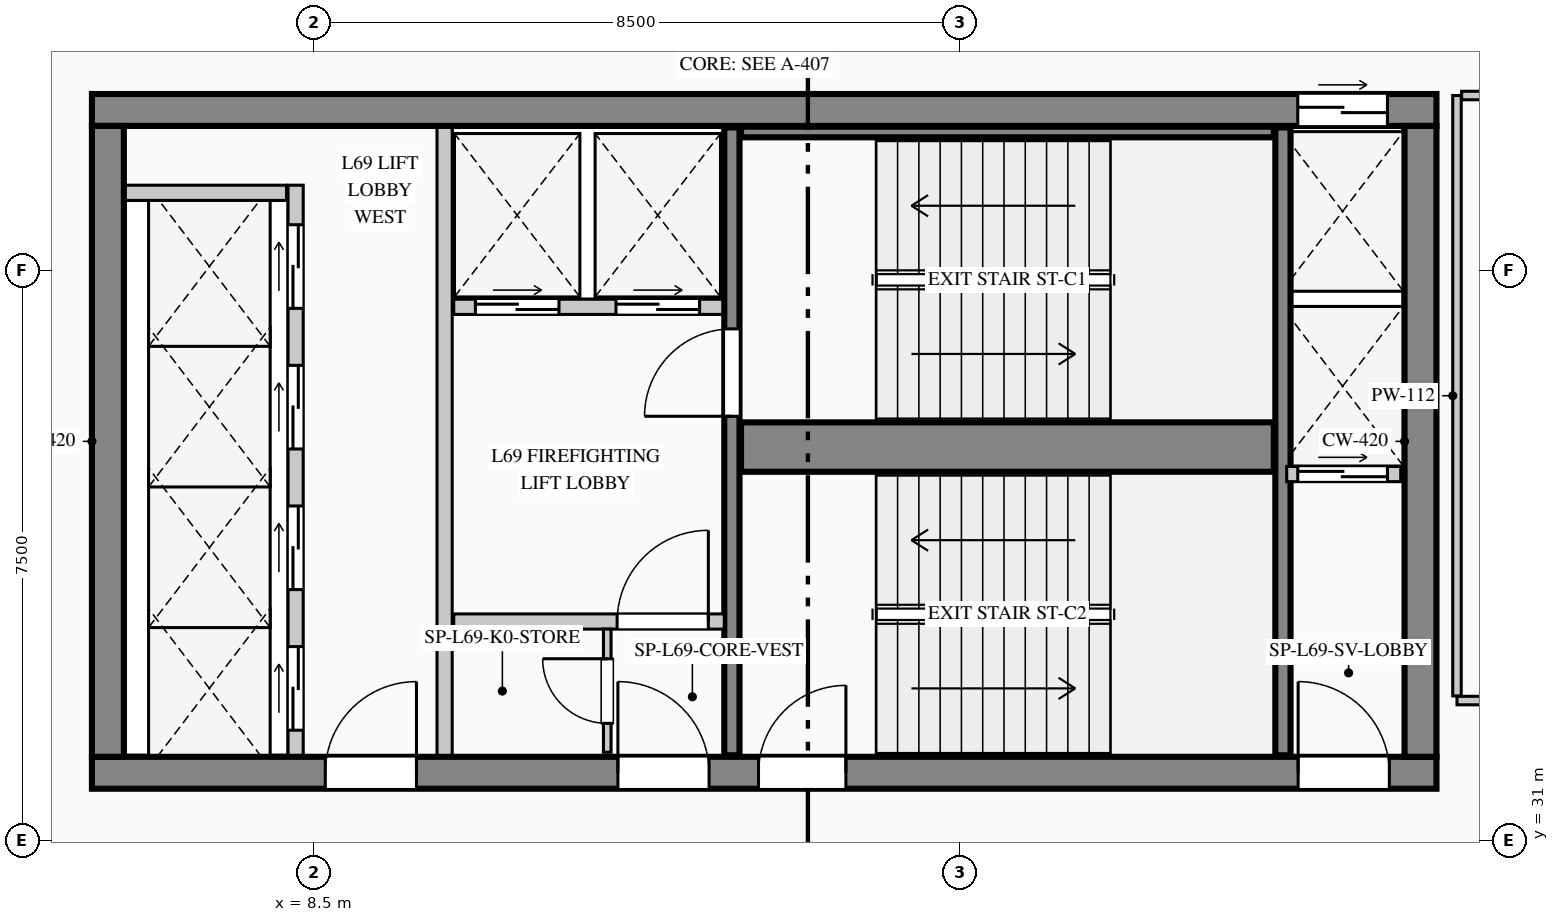
"""IFC4 building model, lengths in metres.
Left out: names, types, materials, properties, quantities, classifications, styles, units other than length and angle.
Written with IfcOpenShell. Run it as: python <this file> out.ifc"""

import sys

from ifc_helpers import new_model, si_unit, direction, frame, frame_2d, origin, place, context, subcontext, project, spatial, rectangle, extrude, element, fill, save


model = new_model("IFC4")
c1 = context("Model", 3, precision=1e-05, world=origin(), true_north=direction((0.0, 1.0)))
c2 = subcontext(c1, "Body", "Model", "MODEL_VIEW")
j1 = project(units=[si_unit("LENGTHUNIT", "METRE"), si_unit("PLANEANGLEUNIT", "RADIAN")], contexts=[c1])
p1 = place(None, origin())
s1 = spatial("IfcSite", under=j1, at=p1, CompositionType="ELEMENT")
p2 = place(p1, origin())
s2 = spatial("IfcBuilding", under=s1, at=p2, CompositionType="ELEMENT")
p3 = place(p2, frame((0.0, 0.0, 288.3)))
s3 = spatial("IfcBuildingStorey", under=s2, at=p3, CompositionType="ELEMENT", Elevation=288.3)
p4 = place(p3, frame((5.58, 40.61, 0.0), z_axis=(0.0, 0.0, 1.0), x_axis=(1.0, 0.0, 0.0)))
e1 = element("IfcWall", 1, at=p4, inside=s3, PredefinedType="SHEAR", context=c2, shape_type="SweptSolid", body=[
    extrude(rectangle(XDim=17.69, YDim=0.42, at=frame_2d((8.845, 0.0))), origin(), (0.0, 0.0, 1.0), 3.95),
])
p5 = place(p4, frame((15.865, 0.0, 0.0)))
e2 = element("IfcOpeningElement", 2, at=p5, cuts=e1, PredefinedType="OPENING", context=c2, shape_type="SweptSolid", body=[
    extrude(rectangle(XDim=1.18, YDim=2.25, at=frame_2d((0.59, 1.125))), frame((0.0, 0.22, 0.0), z_axis=(0.0, -1.0, 0.0), x_axis=(1.0, 0.0, 0.0)), (0.0, 0.0, 1.0), 0.44),
])
p6 = place(p3, frame((5.58, 31.89, 0.0), z_axis=(0.0, 0.0, 1.0), x_axis=(1.0, 0.0, 0.0)))
e3 = element("IfcWall", 3, at=p6, inside=s3, PredefinedType="SHEAR", context=c2, shape_type="SweptSolid", body=[
    extrude(rectangle(XDim=17.69, YDim=0.42, at=frame_2d((8.845, 0.0))), origin(), (0.0, 0.0, 1.0), 3.95),
])
p7 = place(p6, frame((3.07, 0.0, 0.0)))
e4 = element("IfcOpeningElement", 4, at=p7, cuts=e3, PredefinedType="OPENING", context=c2, shape_type="SweptSolid", body=[
    extrude(rectangle(XDim=1.2, YDim=2.2, at=frame_2d((0.6, 1.1))), frame((0.0, 0.22, 0.0), z_axis=(0.0, -1.0, 0.0), x_axis=(1.0, 0.0, 0.0)), (0.0, 0.0, 1.0), 0.44),
])
p8 = place(p6, frame((6.92, 0.0, 0.0)))
e5 = element("IfcOpeningElement", 5, at=p8, cuts=e3, PredefinedType="OPENING", context=c2, shape_type="SweptSolid", body=[
    extrude(rectangle(XDim=1.2, YDim=2.2, at=frame_2d((0.6, 1.1))), frame((0.0, 0.22, 0.0), z_axis=(0.0, -1.0, 0.0), x_axis=(1.0, 0.0, 0.0)), (0.0, 0.0, 1.0), 0.44),
])
p9 = place(p6, frame((8.77, 0.0, 0.0)))
e6 = element("IfcOpeningElement", 6, at=p9, cuts=e3, PredefinedType="OPENING", context=c2, shape_type="SweptSolid", body=[
    extrude(rectangle(XDim=1.15, YDim=2.2, at=frame_2d((0.575, 1.1))), frame((0.0, 0.22, 0.0), z_axis=(0.0, -1.0, 0.0), x_axis=(1.0, 0.0, 0.0)), (0.0, 0.0, 1.0), 0.44),
])
p10 = place(p6, frame((15.87, 0.0, 0.0)))
e7 = element("IfcOpeningElement", 7, at=p10, cuts=e3, PredefinedType="OPENING", context=c2, shape_type="SweptSolid", body=[
    extrude(rectangle(XDim=1.2, YDim=2.2, at=frame_2d((0.6, 1.1))), frame((0.0, 0.22, 0.0), z_axis=(0.0, -1.0, 0.0), x_axis=(1.0, 0.0, 0.0)), (0.0, 0.0, 1.0), 0.44),
])
for number, where, z_axis, x_axis in (
    (8, (5.79, 32.1, 0.0), (0.0, 0.0, 1.0), (0.0, 1.0, 0.0)),
    (9, (23.06, 32.1, 0.0), (0.0, 0.0, 1.0), (0.0, 1.0, 0.0)),
):
    element("IfcWall", number, at=place(p3, frame(where, z_axis=z_axis, x_axis=x_axis)), inside=s3, PredefinedType="SHEAR", context=c2, shape_type="SweptSolid", body=[
        extrude(rectangle(XDim=8.3, YDim=0.42, at=frame_2d((4.15, 0.0))), origin(), (0.0, 0.0, 1.0), 3.95),
    ])
p11 = place(p3, frame((14.0, 32.12, 0.0), z_axis=(0.0, 0.0, 1.0), x_axis=(0.0, 1.0, 0.0)))
e10 = element("IfcWall", 10, at=p11, inside=s3, PredefinedType="SHEAR", context=c2, shape_type="SweptSolid", body=[
    extrude(rectangle(XDim=8.26, YDim=0.2, at=frame_2d((4.13, 0.0))), origin(), (0.0, 0.0, 1.0), 3.95),
])
p12 = place(p11, frame((4.46, 0.0, 0.0)))
e11 = element("IfcOpeningElement", 11, at=p12, cuts=e10, PredefinedType="OPENING", context=c2, shape_type="SweptSolid", body=[
    extrude(rectangle(XDim=1.15, YDim=2.2, at=frame_2d((0.575, 1.1))), frame((0.0, 0.11, 0.0), z_axis=(0.0, -1.0, 0.0), x_axis=(1.0, 0.0, 0.0)), (0.0, 0.0, 1.0), 0.22),
])
p13 = place(p3, frame((14.12, 36.175, 0.0), z_axis=(0.0, 0.0, 1.0), x_axis=(1.0, 0.0, 0.0)))
e12 = element("IfcWall", 12, at=p13, inside=s3, PredefinedType="SHEAR", context=c2, shape_type="SweptSolid", body=[
    extrude(rectangle(XDim=7.01, YDim=0.65, at=frame_2d((3.505, 0.0))), origin(), (0.0, 0.0, 1.0), 3.95),
])
p14 = place(p3, frame((21.25, 32.12, 0.0), z_axis=(0.0, 0.0, 1.0), x_axis=(0.0, 1.0, 0.0)))
e13 = element("IfcWall", 13, at=p14, inside=s3, PredefinedType="SHEAR", context=c2, shape_type="SweptSolid", body=[
    extrude(rectangle(XDim=8.26, YDim=0.2, at=frame_2d((4.13, 0.0))), origin(), (0.0, 0.0, 1.0), 3.95),
])
p15 = place(p3, frame((14.12, 40.32, 0.0), z_axis=(0.0, 0.0, 1.0), x_axis=(1.0, 0.0, 0.0)))
e14 = element("IfcWall", 14, at=p15, inside=s3, PredefinedType="SHEAR", context=c2, shape_type="SweptSolid", body=[
    extrude(rectangle(XDim=7.01, YDim=0.14, at=frame_2d((3.505, 0.0))), origin(), (0.0, 0.0, 1.0), 3.95),
])
p16 = place(p3, frame((5.6, 4.32, 0.0), z_axis=(0.0, 0.0, 1.0), x_axis=(-0.075839920993, 0.997120006009, 0.0)))
e15 = element("IfcWall", 15, at=p16, inside=s3, PredefinedType="STANDARD", context=c2, shape_type="SweptSolid", body=[
    extrude(rectangle(XDim=37.468, YDim=0.24, at=frame_2d((18.734, 0.0))), origin(), (0.0, 0.0, 1.0), 3.7),
])
p17 = place(p16, frame((23.154, 0.0, 0.9)))
e16 = element("IfcOpeningElement", 16, at=p17, cuts=e15, PredefinedType="OPENING", context=c2, shape_type="SweptSolid", body=[
    extrude(rectangle(XDim=1.65, YDim=1.95, at=frame_2d((0.825, 0.975))), frame((0.0, 0.13, 0.0), z_axis=(0.0, -1.0, 0.0), x_axis=(1.0, 0.0, 0.0)), (0.0, 0.0, 1.0), 0.26),
])
p18 = place(p3, frame((8.26, 32.12, 0.0), z_axis=(0.0, 0.0, 1.0), x_axis=(0.0, 1.0, 0.0)))
e17 = element("IfcWall", 17, at=p18, inside=s3, PredefinedType="PARTITIONING", context=c2, shape_type="SweptSolid", body=[
    extrude(rectangle(XDim=7.5, YDim=0.2, at=frame_2d((3.75, 0.0))), origin(), (0.0, 0.0, 1.0), 3.7),
])
p19 = place(p18, frame((0.33, 0.0, 0.0)))
e18 = element("IfcOpeningElement", 18, at=p19, cuts=e17, PredefinedType="OPENING", context=c2, shape_type="SweptSolid", body=[
    extrude(rectangle(XDim=1.1, YDim=2.2, at=frame_2d((0.55, 1.1))), frame((0.0, 0.11, 0.0), z_axis=(0.0, -1.0, 0.0), x_axis=(1.0, 0.0, 0.0)), (0.0, 0.0, 1.0), 0.22),
])
p20 = place(p18, frame((2.18, 0.0, 0.0)))
e19 = element("IfcOpeningElement", 19, at=p20, cuts=e17, PredefinedType="OPENING", context=c2, shape_type="SweptSolid", body=[
    extrude(rectangle(XDim=1.1, YDim=2.2, at=frame_2d((0.55, 1.1))), frame((0.0, 0.11, 0.0), z_axis=(0.0, -1.0, 0.0), x_axis=(1.0, 0.0, 0.0)), (0.0, 0.0, 1.0), 0.22),
])
p21 = place(p18, frame((4.03, 0.0, 0.0)))
e20 = element("IfcOpeningElement", 20, at=p21, cuts=e17, PredefinedType="OPENING", context=c2, shape_type="SweptSolid", body=[
    extrude(rectangle(XDim=1.1, YDim=2.2, at=frame_2d((0.55, 1.1))), frame((0.0, 0.11, 0.0), z_axis=(0.0, -1.0, 0.0), x_axis=(1.0, 0.0, 0.0)), (0.0, 0.0, 1.0), 0.22),
])
p22 = place(p18, frame((5.88, 0.0, 0.0)))
e21 = element("IfcOpeningElement", 21, at=p22, cuts=e17, PredefinedType="OPENING", context=c2, shape_type="SweptSolid", body=[
    extrude(rectangle(XDim=1.1, YDim=2.2, at=frame_2d((0.55, 1.1))), frame((0.0, 0.11, 0.0), z_axis=(0.0, -1.0, 0.0), x_axis=(1.0, 0.0, 0.0)), (0.0, 0.0, 1.0), 0.22),
])
p23 = place(p3, frame((6.02, 39.52, 0.0), z_axis=(0.0, 0.0, 1.0), x_axis=(1.0, 0.0, 0.0)))
e22 = element("IfcWall", 22, at=p23, inside=s3, PredefinedType="PARTITIONING", context=c2, shape_type="SweptSolid", body=[
    extrude(rectangle(XDim=2.12, YDim=0.2, at=frame_2d((1.06, 0.0))), origin(), (0.0, 0.0, 1.0), 3.7),
])
p24 = place(p3, frame((10.22, 32.12, 0.0), z_axis=(0.0, 0.0, 1.0), x_axis=(0.0, 1.0, 0.0)))
e23 = element("IfcWall", 23, at=p24, inside=s3, PredefinedType="PARTITIONING", context=c2, shape_type="SweptSolid", body=[
    extrude(rectangle(XDim=8.26, YDim=0.2, at=frame_2d((4.13, 0.0))), origin(), (0.0, 0.0, 1.0), 3.7),
])
p25 = place(p3, frame((10.34, 38.02, 0.0), z_axis=(0.0, 0.0, 1.0), x_axis=(1.0, 0.0, 0.0)))
e24 = element("IfcWall", 24, at=p25, inside=s3, PredefinedType="PARTITIONING", context=c2, shape_type="SweptSolid", body=[
    extrude(rectangle(XDim=3.54, YDim=0.2, at=frame_2d((1.77, 0.0))), origin(), (0.0, 0.0, 1.0), 3.7),
])
p26 = place(p25, frame((0.285, 0.0, 0.0)))
e25 = element("IfcOpeningElement", 25, at=p26, cuts=e24, PredefinedType="OPENING", context=c2, shape_type="SweptSolid", body=[
    extrude(rectangle(XDim=1.1, YDim=2.2, at=frame_2d((0.55, 1.1))), frame((0.0, 0.11, 0.0), z_axis=(0.0, -1.0, 0.0), x_axis=(1.0, 0.0, 0.0)), (0.0, 0.0, 1.0), 0.22),
])
p27 = place(p25, frame((2.135, 0.0, 0.0)))
e26 = element("IfcOpeningElement", 26, at=p27, cuts=e24, PredefinedType="OPENING", context=c2, shape_type="SweptSolid", body=[
    extrude(rectangle(XDim=1.1, YDim=2.2, at=frame_2d((0.55, 1.1))), frame((0.0, 0.11, 0.0), z_axis=(0.0, -1.0, 0.0), x_axis=(1.0, 0.0, 0.0)), (0.0, 0.0, 1.0), 0.22),
])
p28 = place(p3, frame((10.34, 33.88, 0.0), z_axis=(0.0, 0.0, 1.0), x_axis=(1.0, 0.0, 0.0)))
e27 = element("IfcWall", 27, at=p28, inside=s3, PredefinedType="PARTITIONING", context=c2, shape_type="SweptSolid", body=[
    extrude(rectangle(XDim=3.56, YDim=0.2, at=frame_2d((1.78, 0.0))), origin(), (0.0, 0.0, 1.0), 3.7),
])
p29 = place(p28, frame((2.15, 0.0, 0.0)))
e28 = element("IfcOpeningElement", 28, at=p29, cuts=e27, PredefinedType="OPENING", context=c2, shape_type="SweptSolid", body=[
    extrude(rectangle(XDim=1.2, YDim=2.2, at=frame_2d((0.6, 1.1))), frame((0.0, 0.11, 0.0), z_axis=(0.0, -1.0, 0.0), x_axis=(1.0, 0.0, 0.0)), (0.0, 0.0, 1.0), 0.22),
])
p30 = place(p3, frame((12.36, 32.16, 0.0), z_axis=(0.0, 0.0, 1.0), x_axis=(0.0, 1.0, 0.0)))
e29 = element("IfcWall", 29, at=p30, inside=s3, PredefinedType="PARTITIONING", context=c2, shape_type="SweptSolid", body=[
    extrude(rectangle(XDim=1.62, YDim=0.1, at=frame_2d((0.81, 0.0))), origin(), (0.0, 0.0, 1.0), 3.7),
])
p31 = place(p30, frame((0.38, 0.0, 0.0)))
e30 = element("IfcOpeningElement", 30, at=p31, cuts=e29, PredefinedType="OPENING", context=c2, shape_type="SweptSolid", body=[
    extrude(rectangle(XDim=0.85, YDim=2.1, at=frame_2d((0.425, 1.05))), frame((0.0, 0.06, 0.0), z_axis=(0.0, -1.0, 0.0), x_axis=(1.0, 0.0, 0.0)), (0.0, 0.0, 1.0), 0.12),
])
p32 = place(p3, frame((21.3, 35.82, 0.0), z_axis=(0.0, 0.0, 1.0), x_axis=(1.0, 0.0, 0.0)))
e31 = element("IfcWall", 31, at=p32, inside=s3, PredefinedType="PARTITIONING", context=c2, shape_type="SweptSolid", body=[
    extrude(rectangle(XDim=1.5, YDim=0.2, at=frame_2d((0.75, 0.0))), origin(), (0.0, 0.0, 1.0), 3.7),
])
p33 = place(p32, frame((0.145, 0.0, 0.0)))
e32 = element("IfcOpeningElement", 32, at=p33, cuts=e31, PredefinedType="OPENING", context=c2, shape_type="SweptSolid", body=[
    extrude(rectangle(XDim=1.18, YDim=2.25, at=frame_2d((0.59, 1.125))), frame((0.0, 0.11, 0.0), z_axis=(0.0, -1.0, 0.0), x_axis=(1.0, 0.0, 0.0)), (0.0, 0.0, 1.0), 0.22),
])
p34 = place(p3, frame((28.654, 32.84, 0.0), z_axis=(0.0, 0.0, 1.0), x_axis=(-1.0, 0.0, 0.0)))
e33 = element("IfcWall", 33, at=p34, inside=s3, PredefinedType="PARTITIONING", context=c2, shape_type="SweptSolid", body=[
    extrude(rectangle(XDim=5.114, YDim=0.112, at=frame_2d((2.557, 0.0))), origin(), (0.0, 0.0, 1.0), 3.7),
])
p35 = place(p34, frame((2.677, 0.0, 0.0)))
e34 = element("IfcOpeningElement", 34, at=p35, cuts=e33, PredefinedType="OPENING", context=c2, shape_type="SweptSolid", body=[
    extrude(rectangle(XDim=1.0, YDim=2.15, at=frame_2d((0.5, 1.075))), frame((0.0, 0.066, 0.0), z_axis=(0.0, -1.0, 0.0), x_axis=(1.0, 0.0, 0.0)), (0.0, 0.0, 1.0), 0.132),
])
p36 = place(p3, frame((23.54, 32.901, 0.0), z_axis=(0.0, 0.0, 1.0), x_axis=(0.0, 1.0, 0.0)))
e35 = element("IfcWall", 35, at=p36, inside=s3, PredefinedType="PARTITIONING", context=c2, shape_type="SweptSolid", body=[
    extrude(rectangle(XDim=7.899, YDim=0.112, at=frame_2d((3.95, 0.0))), origin(), (0.0, 0.0, 1.0), 3.7),
])
p37 = place(p3, frame((23.601, 40.8, 0.0), z_axis=(0.0, 0.0, 1.0), x_axis=(1.0, 0.0, 0.0)))
e36 = element("IfcWall", 36, at=p37, inside=s3, PredefinedType="PARTITIONING", context=c2, shape_type="SweptSolid", body=[
    extrude(rectangle(XDim=5.869, YDim=0.112, at=frame_2d((2.935, 0.0))), origin(), (0.0, 0.0, 1.0), 3.7),
])
p38 = place(p7, origin())
e37 = element("IfcDoor", 37, at=p38, inside=s3, OperationType="SINGLE_SWING_RIGHT", PredefinedType="DOOR", context=c2, shape_type="SweptSolid", body=[
    extrude(rectangle(XDim=1.2, YDim=2.2, at=frame_2d((0.6, 1.1))), frame((0.0, 0.025, 0.0), z_axis=(0.0, -1.0, 0.0), x_axis=(1.0, 0.0, 0.0)), (0.0, 0.0, 1.0), 0.05),
])
fill(e4, e37)
p39 = place(p8, origin())
e38 = element("IfcDoor", 38, at=p39, inside=s3, OperationType="SINGLE_SWING_LEFT", PredefinedType="DOOR", context=c2, shape_type="SweptSolid", body=[
    extrude(rectangle(XDim=1.2, YDim=2.2, at=frame_2d((0.6, 1.1))), frame((0.0, 0.025, 0.0), z_axis=(0.0, -1.0, 0.0), x_axis=(1.0, 0.0, 0.0)), (0.0, 0.0, 1.0), 0.05),
])
fill(e5, e38)
p40 = place(p9, origin())
e39 = element("IfcDoor", 39, at=p40, inside=s3, OperationType="SINGLE_SWING_RIGHT", PredefinedType="DOOR", context=c2, shape_type="SweptSolid", body=[
    extrude(rectangle(XDim=1.15, YDim=2.2, at=frame_2d((0.575, 1.1))), frame((0.0, 0.025, 0.0), z_axis=(0.0, -1.0, 0.0), x_axis=(1.0, 0.0, 0.0)), (0.0, 0.0, 1.0), 0.05),
])
fill(e6, e39)
p41 = place(p10, origin())
e40 = element("IfcDoor", 40, at=p41, inside=s3, OperationType="SINGLE_SWING_LEFT", PredefinedType="DOOR", context=c2, shape_type="SweptSolid", body=[
    extrude(rectangle(XDim=1.2, YDim=2.2, at=frame_2d((0.6, 1.1))), frame((0.0, 0.025, 0.0), z_axis=(0.0, -1.0, 0.0), x_axis=(1.0, 0.0, 0.0)), (0.0, 0.0, 1.0), 0.05),
])
fill(e7, e40)
p42 = place(p29, origin())
e41 = element("IfcDoor", 41, at=p42, inside=s3, OperationType="SINGLE_SWING_RIGHT", PredefinedType="DOOR", context=c2, shape_type="SweptSolid", body=[
    extrude(rectangle(XDim=1.2, YDim=2.2, at=frame_2d((0.6, 1.1))), frame((0.0, 0.025, 0.0), z_axis=(0.0, -1.0, 0.0), x_axis=(1.0, 0.0, 0.0)), (0.0, 0.0, 1.0), 0.05),
])
fill(e28, e41)
p43 = place(p31, origin())
e42 = element("IfcDoor", 42, at=p43, inside=s3, OperationType="SINGLE_SWING_RIGHT", PredefinedType="DOOR", context=c2, shape_type="SweptSolid", body=[
    extrude(rectangle(XDim=0.85, YDim=2.1, at=frame_2d((0.425, 1.05))), frame((0.0, 0.025, 0.0), z_axis=(0.0, -1.0, 0.0), x_axis=(1.0, 0.0, 0.0)), (0.0, 0.0, 1.0), 0.05),
])
fill(e30, e42)
p44 = place(p12, origin())
e43 = element("IfcDoor", 43, at=p44, inside=s3, OperationType="SINGLE_SWING_LEFT", PredefinedType="DOOR", context=c2, shape_type="SweptSolid", body=[
    extrude(rectangle(XDim=1.15, YDim=2.2, at=frame_2d((0.575, 1.1))), frame((0.0, 0.025, 0.0), z_axis=(0.0, -1.0, 0.0), x_axis=(1.0, 0.0, 0.0)), (0.0, 0.0, 1.0), 0.05),
])
fill(e11, e43)
p45 = place(p19, origin())
e44 = element("IfcDoor", 44, at=p45, inside=s3, OperationType="DOUBLE_DOOR_SLIDING", PredefinedType="DOOR", context=c2, shape_type="SweptSolid", body=[
    extrude(rectangle(XDim=1.1, YDim=2.2, at=frame_2d((0.55, 1.1))), frame((0.0, 0.025, 0.0), z_axis=(0.0, -1.0, 0.0), x_axis=(1.0, 0.0, 0.0)), (0.0, 0.0, 1.0), 0.05),
])
fill(e18, e44)
p46 = place(p20, origin())
e45 = element("IfcDoor", 45, at=p46, inside=s3, OperationType="DOUBLE_DOOR_SLIDING", PredefinedType="DOOR", context=c2, shape_type="SweptSolid", body=[
    extrude(rectangle(XDim=1.1, YDim=2.2, at=frame_2d((0.55, 1.1))), frame((0.0, 0.025, 0.0), z_axis=(0.0, -1.0, 0.0), x_axis=(1.0, 0.0, 0.0)), (0.0, 0.0, 1.0), 0.05),
])
fill(e19, e45)
p47 = place(p21, origin())
e46 = element("IfcDoor", 46, at=p47, inside=s3, OperationType="DOUBLE_DOOR_SLIDING", PredefinedType="DOOR", context=c2, shape_type="SweptSolid", body=[
    extrude(rectangle(XDim=1.1, YDim=2.2, at=frame_2d((0.55, 1.1))), frame((0.0, 0.025, 0.0), z_axis=(0.0, -1.0, 0.0), x_axis=(1.0, 0.0, 0.0)), (0.0, 0.0, 1.0), 0.05),
])
fill(e20, e46)
p48 = place(p22, origin())
e47 = element("IfcDoor", 47, at=p48, inside=s3, OperationType="DOUBLE_DOOR_SLIDING", PredefinedType="DOOR", context=c2, shape_type="SweptSolid", body=[
    extrude(rectangle(XDim=1.1, YDim=2.2, at=frame_2d((0.55, 1.1))), frame((0.0, 0.025, 0.0), z_axis=(0.0, -1.0, 0.0), x_axis=(1.0, 0.0, 0.0)), (0.0, 0.0, 1.0), 0.05),
])
fill(e21, e47)
p49 = place(p26, origin())
e48 = element("IfcDoor", 48, at=p49, inside=s3, OperationType="DOUBLE_DOOR_SLIDING", PredefinedType="DOOR", context=c2, shape_type="SweptSolid", body=[
    extrude(rectangle(XDim=1.1, YDim=2.2, at=frame_2d((0.55, 1.1))), frame((0.0, 0.025, 0.0), z_axis=(0.0, -1.0, 0.0), x_axis=(1.0, 0.0, 0.0)), (0.0, 0.0, 1.0), 0.05),
])
fill(e25, e48)
p50 = place(p27, origin())
e49 = element("IfcDoor", 49, at=p50, inside=s3, OperationType="DOUBLE_DOOR_SLIDING", PredefinedType="DOOR", context=c2, shape_type="SweptSolid", body=[
    extrude(rectangle(XDim=1.1, YDim=2.2, at=frame_2d((0.55, 1.1))), frame((0.0, 0.025, 0.0), z_axis=(0.0, -1.0, 0.0), x_axis=(1.0, 0.0, 0.0)), (0.0, 0.0, 1.0), 0.05),
])
fill(e26, e49)
p51 = place(p5, origin())
e50 = element("IfcDoor", 50, at=p51, inside=s3, OperationType="DOUBLE_DOOR_SLIDING", PredefinedType="DOOR", context=c2, shape_type="SweptSolid", body=[
    extrude(rectangle(XDim=1.18, YDim=2.25, at=frame_2d((0.59, 1.125))), frame((0.0, 0.025, 0.0), z_axis=(0.0, -1.0, 0.0), x_axis=(1.0, 0.0, 0.0)), (0.0, 0.0, 1.0), 0.05),
])
fill(e2, e50)
p52 = place(p33, origin())
e51 = element("IfcDoor", 51, at=p52, inside=s3, OperationType="DOUBLE_DOOR_SLIDING", PredefinedType="DOOR", context=c2, shape_type="SweptSolid", body=[
    extrude(rectangle(XDim=1.18, YDim=2.25, at=frame_2d((0.59, 1.125))), frame((0.0, 0.025, 0.0), z_axis=(0.0, -1.0, 0.0), x_axis=(1.0, 0.0, 0.0)), (0.0, 0.0, 1.0), 0.05),
])
fill(e32, e51)
save(model, sys.argv[1])
